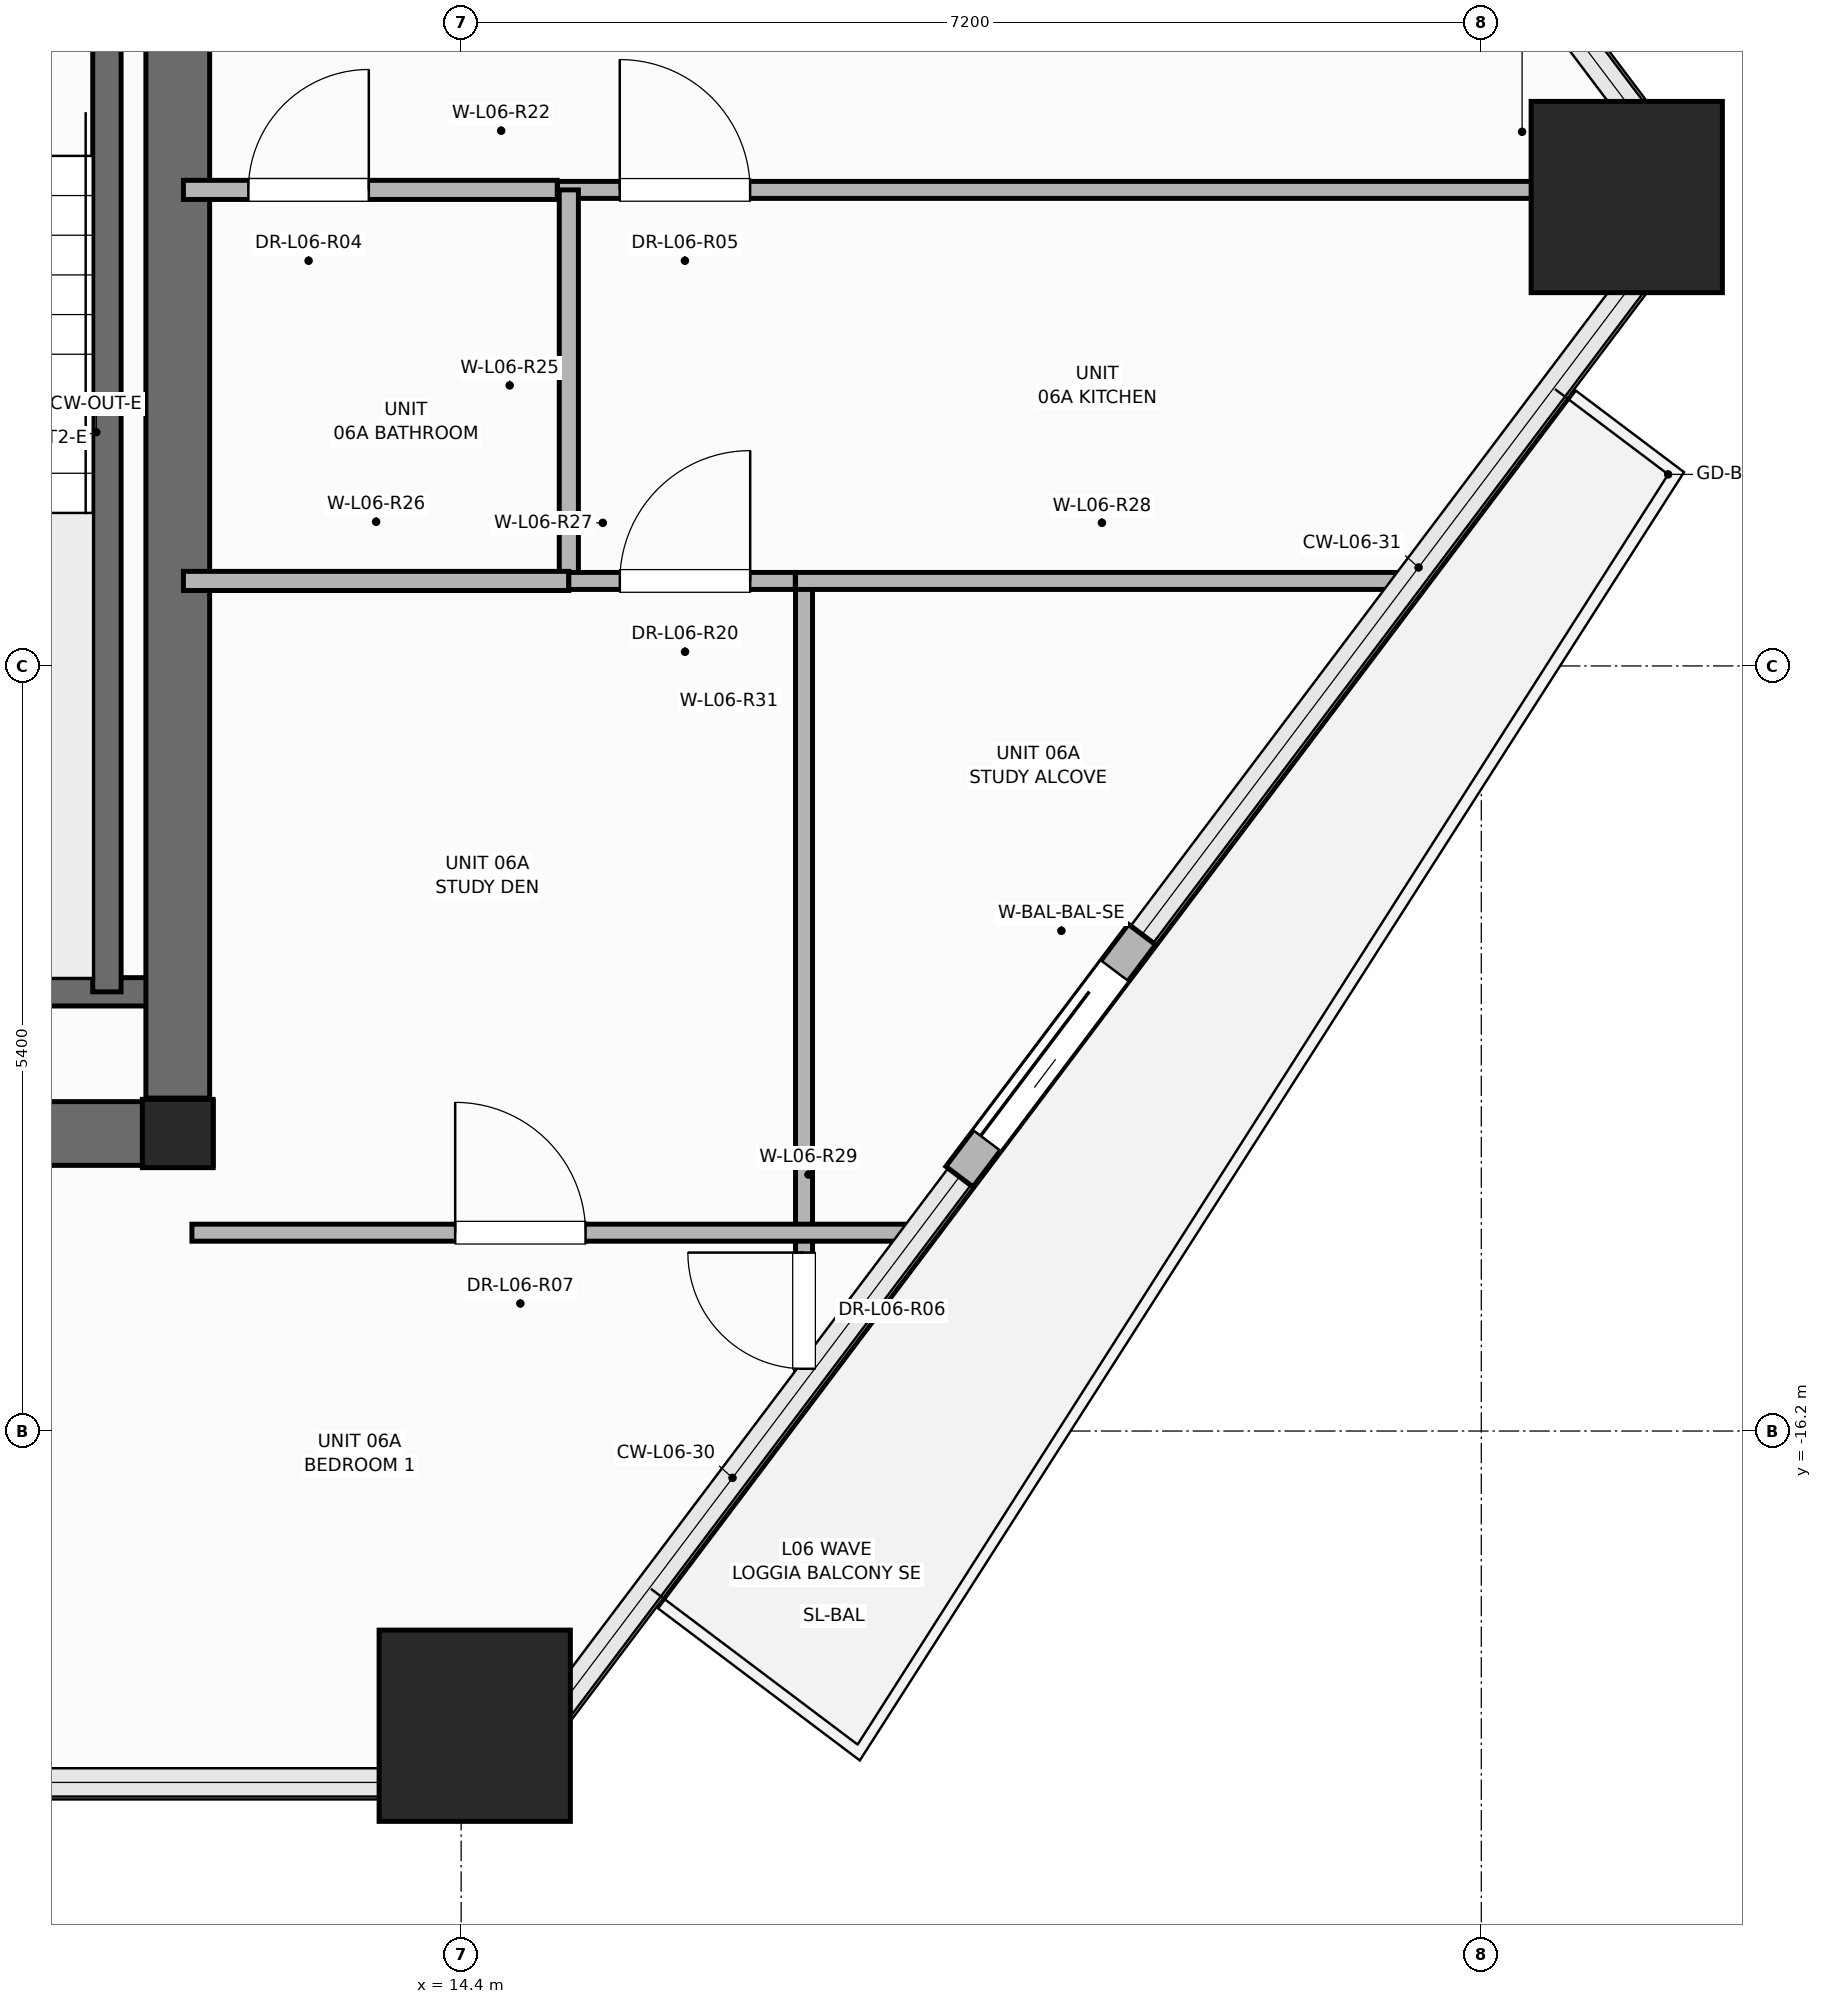
"""IFC4 building model, lengths in metres.
Left out: names, types, materials, properties, quantities, classifications, styles, units other than length and angle.
Written with IfcOpenShell. Run it as: python <this file> out.ifc"""

import sys

from ifc_helpers import new_model, si_unit, direction, frame, frame_2d, origin, origin_2d, place, context, subcontext, project, spatial, rectangle, hollow_rectangle, i_section, extrude, element, fill, save


model = new_model("IFC4")
c1 = context("Model", 3, precision=1e-05, world=origin(), true_north=direction((0.0, 1.0)))
c2 = subcontext(c1, "Body", "Model", "MODEL_VIEW")
j1 = project(units=[si_unit("LENGTHUNIT", "METRE"), si_unit("PLANEANGLEUNIT", "RADIAN")], contexts=[c1])
p1 = place(None, origin())
s1 = spatial("IfcSite", under=j1, at=p1, CompositionType="ELEMENT")
p2 = place(p1, origin())
s2 = spatial("IfcBuilding", under=s1, at=p2, CompositionType="ELEMENT")
p3 = place(p2, frame((0.0, 0.0, 27.9)))
s3 = spatial("IfcBuildingStorey", under=s2, at=p3, CompositionType="ELEMENT", Elevation=27.9)
for number, where, z_axis, x_axis in (
    (1, (14.496, -18.28, 0.0), (0.0, 0.0, 1.0), (1.0, 0.0, 0.0)),
    (2, (22.626, -7.49, 0.0), (0.0, 0.0, 1.0), (1.0, 0.0, 0.0)),
):
    element("IfcColumn", number, at=place(p3, frame(where, z_axis=z_axis, x_axis=x_axis)), inside=s3, PredefinedType="COLUMN", context=c2, shape_type="SweptSolid", body=[
        extrude(hollow_rectangle(XDim=1.35, YDim=1.35, WallThickness=0.065, at=origin_2d()), origin(), (0.0, 0.0, 1.0), 3.6),
    ])
p4 = place(p3, frame((12.4, -14.1, 0.0), z_axis=(0.0, 0.0, 1.0), x_axis=(1.0, 0.0, 0.0)))
e3 = element("IfcColumn", 3, at=p4, inside=s3, PredefinedType="COLUMN", context=c2, shape_type="SweptSolid", body=[
    extrude(i_section(OverallWidth=0.5, OverallDepth=0.482, WebThickness=0.04, FlangeThickness=0.045, at=origin_2d()), origin(), (0.0, 0.0, 1.0), 3.6),
])
p5 = place(p3, frame((17.917, -14.405, -0.015), z_axis=(0.0, 0.0, 1.0), x_axis=(0.601896635284, 0.798574004357, 0.0)))
e4 = element("IfcWall", 4, at=p5, inside=s3, PredefinedType="STANDARD", context=c2, shape_type="SweptSolid", body=[
    extrude(rectangle(XDim=2.14, YDim=0.24, at=frame_2d((1.07, 0.0))), origin(), (0.0, 0.0, 1.0), 2.728),
])
p6 = place(p5, frame((0.32, 0.0, 0.015)))
e5 = element("IfcOpeningElement", 5, at=p6, cuts=e4, PredefinedType="OPENING", context=c2, shape_type="SweptSolid", body=[
    extrude(rectangle(XDim=1.506, YDim=2.204, at=frame_2d((0.75, 1.102))), frame((0.0, 0.13, 0.0), z_axis=(0.0, -1.0, 0.0), x_axis=(1.0, 0.0, 0.0)), (0.0, 0.0, 1.0), 0.26),
])
p7 = place(p3, frame((-12.65, -14.1, 0.0), z_axis=(0.0, 0.0, 1.0), x_axis=(1.0, 0.0, 0.0)))
e6 = element("IfcWall", 6, at=p7, inside=s3, PredefinedType="SHEAR", context=c2, shape_type="SweptSolid", body=[
    extrude(rectangle(XDim=25.3, YDim=0.45, at=frame_2d((12.65, 0.0))), origin(), (0.0, 0.0, 1.0), 3.6),
])
p8 = place(p3, frame((8.48, -13.1, 0.0), z_axis=(0.0, 0.0, 1.0), x_axis=(1.0, 0.0, 0.0)))
e7 = element("IfcWall", 7, at=p8, inside=s3, PredefinedType="SOLIDWALL", context=c2, shape_type="SweptSolid", body=[
    extrude(rectangle(XDim=3.87, YDim=0.2, at=frame_2d((1.935, 0.0))), origin(), (0.0, 0.0, 1.0), 3.6),
])
p9 = place(p3, frame((11.9, -13.1, 0.0), z_axis=(0.0, 0.0, 1.0), x_axis=(0.0, 1.0, 0.0)))
e8 = element("IfcWall", 8, at=p9, inside=s3, PredefinedType="SOLIDWALL", context=c2, shape_type="SweptSolid", body=[
    extrude(rectangle(XDim=7.58, YDim=0.2, at=frame_2d((3.79, 0.0))), origin(), (0.0, 0.0, 1.0), 3.6),
])
p10 = place(p3, frame((12.4, -13.85, 0.0), z_axis=(0.0, 0.0, 1.0), x_axis=(0.0, 1.0, 0.0)))
e9 = element("IfcWall", 9, at=p10, inside=s3, PredefinedType="SHEAR", context=c2, shape_type="SweptSolid", body=[
    extrude(rectangle(XDim=9.4, YDim=0.45, at=frame_2d((4.7, 0.0))), origin(), (0.0, 0.0, 1.0), 3.6),
])
p11 = place(p3, frame((15.08, -7.44, 0.0), z_axis=(0.0, 0.0, 1.0), x_axis=(1.0, 0.0, 0.0)))
e10 = element("IfcWall", 10, at=p11, inside=s3, PredefinedType="PARTITIONING", context=c2, shape_type="SweptSolid", body=[
    extrude(rectangle(XDim=8.009, YDim=0.12, at=frame_2d((4.005, 0.0))), origin(), (0.0, 0.0, 1.0), 2.325),
])
p12 = place(p11, frame((0.439, 0.0, 0.0)))
e11 = element("IfcOpeningElement", 11, at=p12, cuts=e10, PredefinedType="OPENING", context=c2, shape_type="SweptSolid", body=[
    extrude(rectangle(XDim=0.926, YDim=2.104, at=frame_2d((0.46, 1.052))), frame((0.0, 0.07, 0.0), z_axis=(0.0, -1.0, 0.0), x_axis=(1.0, 0.0, 0.0)), (0.0, 0.0, 1.0), 0.14),
])
p13 = place(p3, frame((16.82, -15.861, 0.0), z_axis=(0.0, 0.0, 1.0), x_axis=(0.0, 1.0, 0.0)))
e12 = element("IfcWall", 12, at=p13, inside=s3, PredefinedType="PARTITIONING", context=c2, shape_type="SweptSolid", body=[
    extrude(rectangle(XDim=5.661, YDim=0.12, at=frame_2d((2.83, 0.0))), origin(), (0.0, 0.0, 1.0), 2.713),
])
p14 = place(p13, frame((0.1, 0.0, 0.0)))
e13 = element("IfcOpeningElement", 13, at=p14, cuts=e12, PredefinedType="OPENING", context=c2, shape_type="SweptSolid", body=[
    extrude(rectangle(XDim=0.826, YDim=2.104, at=frame_2d((0.41, 1.052))), frame((0.0, 0.07, 0.0), z_axis=(0.0, -1.0, 0.0), x_axis=(1.0, 0.0, 0.0)), (0.0, 0.0, 1.0), 0.14),
])
p15 = place(p3, frame((12.5, -14.8, 0.0), z_axis=(0.0, 0.0, 1.0), x_axis=(1.0, 0.0, 0.0)))
e14 = element("IfcWall", 14, at=p15, inside=s3, PredefinedType="PARTITIONING", context=c2, shape_type="SweptSolid", body=[
    extrude(rectangle(XDim=5.119, YDim=0.12, at=frame_2d((2.56, 0.0))), origin(), (0.0, 0.0, 1.0), 2.713),
])
p16 = place(p15, frame((1.858, 0.0, 0.0)))
e15 = element("IfcOpeningElement", 15, at=p16, cuts=e14, PredefinedType="OPENING", context=c2, shape_type="SweptSolid", body=[
    extrude(rectangle(XDim=0.926, YDim=2.104, at=frame_2d((0.46, 1.052))), frame((0.0, 0.07, 0.0), z_axis=(0.0, -1.0, 0.0), x_axis=(1.0, 0.0, 0.0)), (0.0, 0.0, 1.0), 0.14),
])
p17 = place(p3, frame((16.76, -10.2, 0.0), z_axis=(0.0, 0.0, 1.0), x_axis=(1.0, 0.0, 0.0)))
e16 = element("IfcWall", 16, at=p17, inside=s3, PredefinedType="PARTITIONING", context=c2, shape_type="SweptSolid", body=[
    extrude(rectangle(XDim=4.325, YDim=0.12, at=frame_2d((2.163, 0.0))), origin(), (0.0, 0.0, 1.0), 2.713),
])
p18 = place(p3, frame((12.44, -7.44, 0.0), z_axis=(0.0, 0.0, 1.0), x_axis=(1.0, 0.0, 0.0)))
e17 = element("IfcWall", 17, at=p18, inside=s3, PredefinedType="PARTITIONING", context=c2, shape_type="SweptSolid", body=[
    extrude(rectangle(XDim=2.638, YDim=0.135, at=frame_2d((1.319, 0.0))), origin(), (0.0, 0.0, 1.0), 2.713),
])
p19 = place(p18, frame((0.458, 0.0, 0.0)))
e18 = element("IfcOpeningElement", 18, at=p19, cuts=e17, PredefinedType="OPENING", context=c2, shape_type="SweptSolid", body=[
    extrude(rectangle(XDim=0.856, YDim=2.104, at=frame_2d((0.425, 1.052))), frame((0.0, 0.078, 0.0), z_axis=(0.0, -1.0, 0.0), x_axis=(1.0, 0.0, 0.0)), (0.0, 0.0, 1.0), 0.155),
])
p20 = place(p3, frame((15.16, -10.2, 0.0), z_axis=(0.0, 0.0, 1.0), x_axis=(0.0, 1.0, 0.0)))
e19 = element("IfcWall", 19, at=p20, inside=s3, PredefinedType="PARTITIONING", context=c2, shape_type="SweptSolid", body=[
    extrude(rectangle(XDim=2.76, YDim=0.135, at=frame_2d((1.38, 0.0))), origin(), (0.0, 0.0, 1.0), 3.35),
])
p21 = place(p3, frame((12.44, -10.2, 0.0), z_axis=(0.0, 0.0, 1.0), x_axis=(1.0, 0.0, 0.0)))
e20 = element("IfcWall", 20, at=p21, inside=s3, PredefinedType="PARTITIONING", context=c2, shape_type="SweptSolid", body=[
    extrude(rectangle(XDim=2.72, YDim=0.135, at=frame_2d((1.36, 0.0))), origin(), (0.0, 0.0, 1.0), 2.713),
])
p22 = place(p3, frame((15.16, -10.2, 0.0), z_axis=(0.0, 0.0, 1.0), x_axis=(1.0, 0.0, 0.0)))
e21 = element("IfcWall", 21, at=p22, inside=s3, PredefinedType="PARTITIONING", context=c2, shape_type="SweptSolid", body=[
    extrude(rectangle(XDim=1.598, YDim=0.12, at=frame_2d((0.799, 0.0))), origin(), (0.0, 0.0, 1.0), 3.35),
])
p23 = place(p22, frame((0.36, 0.0, 0.0)))
e22 = element("IfcOpeningElement", 22, at=p23, cuts=e21, PredefinedType="OPENING", context=c2, shape_type="SweptSolid", body=[
    extrude(rectangle(XDim=0.926, YDim=2.104, at=frame_2d((0.46, 1.052))), frame((0.0, 0.07, 0.0), z_axis=(0.0, -1.0, 0.0), x_axis=(1.0, 0.0, 0.0)), (0.0, 0.0, 1.0), 0.14),
])
p24 = place(p6, origin())
e23 = element("IfcDoor", 23, at=p24, inside=s3, OperationType="SLIDING_TO_RIGHT", PredefinedType="DOOR", context=c2, shape_type="SweptSolid", body=[
    extrude(rectangle(XDim=1.5, YDim=2.2, at=frame_2d((0.75, 1.1))), frame((0.0, 0.025, 0.0), z_axis=(0.0, -1.0, 0.0), x_axis=(1.0, 0.0, 0.0)), (0.0, 0.0, 1.0), 0.05),
])
fill(e5, e23)
p25 = place(p19, origin())
e24 = element("IfcDoor", 24, at=p25, inside=s3, OperationType="SINGLE_SWING_RIGHT", PredefinedType="DOOR", context=c2, shape_type="SweptSolid", body=[
    extrude(rectangle(XDim=0.85, YDim=2.1, at=frame_2d((0.425, 1.05))), frame((0.0, 0.025, 0.0), z_axis=(0.0, -1.0, 0.0), x_axis=(1.0, 0.0, 0.0)), (0.0, 0.0, 1.0), 0.05),
])
fill(e18, e24)
p26 = place(p12, origin())
e25 = element("IfcDoor", 25, at=p26, inside=s3, OperationType="SINGLE_SWING_LEFT", PredefinedType="DOOR", context=c2, shape_type="SweptSolid", body=[
    extrude(rectangle(XDim=0.92, YDim=2.1, at=frame_2d((0.46, 1.05))), frame((0.0, 0.025, 0.0), z_axis=(0.0, -1.0, 0.0), x_axis=(1.0, 0.0, 0.0)), (0.0, 0.0, 1.0), 0.05),
])
fill(e11, e25)
p27 = place(p14, origin())
e26 = element("IfcDoor", 26, at=p27, inside=s3, OperationType="SINGLE_SWING_RIGHT", PredefinedType="DOOR", context=c2, shape_type="SweptSolid", body=[
    extrude(rectangle(XDim=0.82, YDim=2.1, at=frame_2d((0.41, 1.05))), frame((0.0, 0.025, 0.0), z_axis=(0.0, -1.0, 0.0), x_axis=(1.0, 0.0, 0.0)), (0.0, 0.0, 1.0), 0.05),
])
fill(e13, e26)
p28 = place(p16, origin())
e27 = element("IfcDoor", 27, at=p28, inside=s3, OperationType="SINGLE_SWING_LEFT", PredefinedType="DOOR", context=c2, shape_type="SweptSolid", body=[
    extrude(rectangle(XDim=0.92, YDim=2.1, at=frame_2d((0.46, 1.05))), frame((0.0, 0.025, 0.0), z_axis=(0.0, -1.0, 0.0), x_axis=(1.0, 0.0, 0.0)), (0.0, 0.0, 1.0), 0.05),
])
fill(e15, e27)
p29 = place(p23, origin())
e28 = element("IfcDoor", 28, at=p29, inside=s3, OperationType="SINGLE_SWING_RIGHT", PredefinedType="DOOR", context=c2, shape_type="SweptSolid", body=[
    extrude(rectangle(XDim=0.92, YDim=2.1, at=frame_2d((0.46, 1.05))), frame((0.0, 0.025, 0.0), z_axis=(0.0, -1.0, 0.0), x_axis=(1.0, 0.0, 0.0)), (0.0, 0.0, 1.0), 0.05),
])
fill(e22, e28)
save(model, sys.argv[1])
